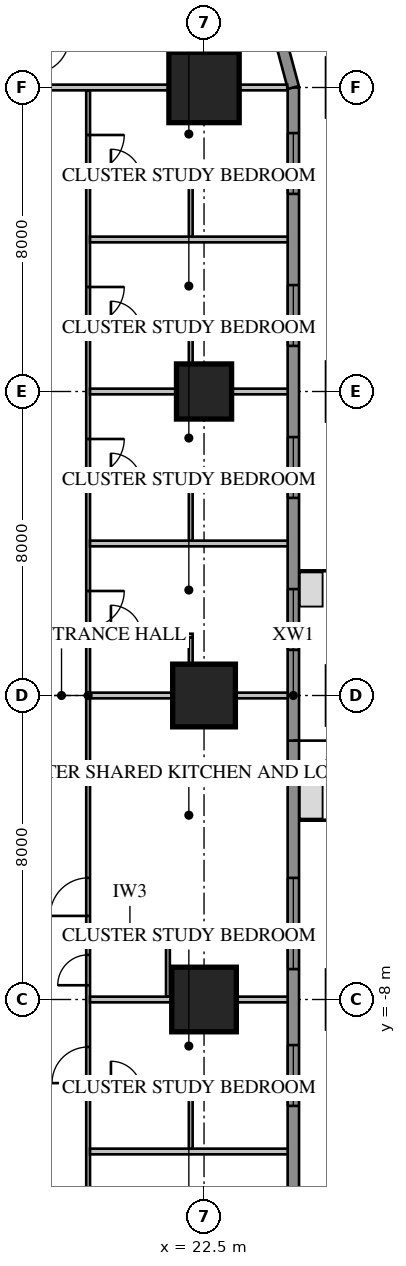
"""IFC4 building model, lengths in metres.
Left out: names, types, materials, properties, quantities, classifications, styles, units other than length and angle.
Written with IfcOpenShell. Run it as: python <this file> out.ifc"""

import sys

from ifc_helpers import new_model, si_unit, direction, frame, frame_2d, origin, origin_2d, place, context, subcontext, project, spatial, rectangle, extrude, element, fill, save


model = new_model("IFC4")
c1 = context("Model", 3, precision=1e-05, world=origin(), true_north=direction((0.0, 1.0)))
c2 = subcontext(c1, "Body", "Model", "MODEL_VIEW")
j1 = project(units=[si_unit("LENGTHUNIT", "METRE"), si_unit("PLANEANGLEUNIT", "RADIAN")], contexts=[c1])
p1 = place(None, origin())
s1 = spatial("IfcSite", under=j1, at=p1, CompositionType="ELEMENT")
p2 = place(p1, origin())
s2 = spatial("IfcBuilding", under=s1, at=p2, CompositionType="ELEMENT")
p3 = place(p2, frame((0.0, 0.0, 19.85)))
s3 = spatial("IfcBuildingStorey", under=s2, at=p3, CompositionType="ELEMENT", Elevation=19.85)
p4 = place(p3, frame((22.5, -8.0, 0.0), z_axis=(0.0, 0.0, 1.0), x_axis=(1.0, 0.0, 0.0)))
e1 = element("IfcColumn", 1, at=p4, inside=s3, PredefinedType="COLUMN", context=c2, shape_type="SweptSolid", body=[
    extrude(rectangle(XDim=1.7, YDim=1.7, at=origin_2d()), origin(), (0.0, 0.0, 1.0), 3.85),
])
p5 = place(p3, frame((22.5, 0.0, 0.0), z_axis=(0.0, 0.0, 1.0), x_axis=(1.0, 0.0, 0.0)))
e2 = element("IfcColumn", 2, at=p5, inside=s3, PredefinedType="COLUMN", context=c2, shape_type="SweptSolid", body=[
    extrude(rectangle(XDim=1.65, YDim=1.65, at=origin_2d()), origin(), (0.0, 0.0, 1.0), 3.85),
])
p6 = place(p3, frame((22.5, 8.0, 0.0), z_axis=(0.0, 0.0, 1.0), x_axis=(1.0, 0.0, 0.0)))
e3 = element("IfcColumn", 3, at=p6, inside=s3, PredefinedType="COLUMN", context=c2, shape_type="SweptSolid", body=[
    extrude(rectangle(XDim=1.45, YDim=1.45, at=origin_2d()), origin(), (0.0, 0.0, 1.0), 3.85),
])
p7 = place(p3, frame((22.5, 16.0, 0.0), z_axis=(0.0, 0.0, 1.0), x_axis=(1.0, 0.0, 0.0)))
e4 = element("IfcColumn", 4, at=p7, inside=s3, PredefinedType="COLUMN", context=c2, shape_type="SweptSolid", body=[
    extrude(rectangle(XDim=1.85, YDim=1.85, at=origin_2d()), origin(), (0.0, 0.0, 1.0), 3.85),
])
p8 = place(p3, frame((24.85, -16.0, 0.0), z_axis=(0.0, 0.0, 1.0), x_axis=(0.0, 1.0, 0.0)))
e5 = element("IfcWall", 5, at=p8, inside=s3, PredefinedType="SOLIDWALL", context=c2, shape_type="SweptSolid", body=[
    extrude(rectangle(XDim=32.0, YDim=0.3, at=frame_2d((16.0, 0.0))), origin(), (0.0, 0.0, 1.0), 3.65),
])
p9 = place(p8, frame((1.2, 0.0, 0.75)))
e6 = element("IfcOpeningElement", 6, at=p9, cuts=e5, PredefinedType="OPENING", context=c2, shape_type="SweptSolid", body=[
    extrude(rectangle(XDim=1.6, YDim=1.8, at=frame_2d((0.8, 0.9))), frame((0.0, 0.17, 0.0), z_axis=(0.0, -1.0, 0.0), x_axis=(1.0, 0.0, 0.0)), (0.0, 0.0, 1.0), 0.34),
])
p10 = place(p8, frame((5.2, 0.0, 0.75)))
e7 = element("IfcOpeningElement", 7, at=p10, cuts=e5, PredefinedType="OPENING", context=c2, shape_type="SweptSolid", body=[
    extrude(rectangle(XDim=1.6, YDim=1.8, at=frame_2d((0.8, 0.9))), frame((0.0, 0.17, 0.0), z_axis=(0.0, -1.0, 0.0), x_axis=(1.0, 0.0, 0.0)), (0.0, 0.0, 1.0), 0.34),
])
p11 = place(p8, frame((17.2, 0.0, 0.75)))
e8 = element("IfcOpeningElement", 8, at=p11, cuts=e5, PredefinedType="OPENING", context=c2, shape_type="SweptSolid", body=[
    extrude(rectangle(XDim=1.6, YDim=1.8, at=frame_2d((0.8, 0.9))), frame((0.0, 0.17, 0.0), z_axis=(0.0, -1.0, 0.0), x_axis=(1.0, 0.0, 0.0)), (0.0, 0.0, 1.0), 0.34),
])
p12 = place(p8, frame((21.2, 0.0, 0.75)))
e9 = element("IfcOpeningElement", 9, at=p12, cuts=e5, PredefinedType="OPENING", context=c2, shape_type="SweptSolid", body=[
    extrude(rectangle(XDim=1.6, YDim=1.8, at=frame_2d((0.8, 0.9))), frame((0.0, 0.17, 0.0), z_axis=(0.0, -1.0, 0.0), x_axis=(1.0, 0.0, 0.0)), (0.0, 0.0, 1.0), 0.34),
])
p13 = place(p8, frame((25.2, 0.0, 0.75)))
e10 = element("IfcOpeningElement", 10, at=p13, cuts=e5, PredefinedType="OPENING", context=c2, shape_type="SweptSolid", body=[
    extrude(rectangle(XDim=1.6, YDim=1.8, at=frame_2d((0.8, 0.9))), frame((0.0, 0.17, 0.0), z_axis=(0.0, -1.0, 0.0), x_axis=(1.0, 0.0, 0.0)), (0.0, 0.0, 1.0), 0.34),
])
p14 = place(p8, frame((29.2, 0.0, 0.75)))
e11 = element("IfcOpeningElement", 11, at=p14, cuts=e5, PredefinedType="OPENING", context=c2, shape_type="SweptSolid", body=[
    extrude(rectangle(XDim=1.6, YDim=1.8, at=frame_2d((0.8, 0.9))), frame((0.0, 0.17, 0.0), z_axis=(0.0, -1.0, 0.0), x_axis=(1.0, 0.0, 0.0)), (0.0, 0.0, 1.0), 0.34),
])
p15 = place(p8, frame((8.8, 0.0, 0.75)))
e12 = element("IfcOpeningElement", 12, at=p15, cuts=e5, PredefinedType="OPENING", context=c2, shape_type="SweptSolid", body=[
    extrude(rectangle(XDim=2.4, YDim=1.8, at=frame_2d((1.2, 0.9))), frame((0.0, 0.17, 0.0), z_axis=(0.0, -1.0, 0.0), x_axis=(1.0, 0.0, 0.0)), (0.0, 0.0, 1.0), 0.34),
])
p16 = place(p8, frame((13.812, 0.0, 0.0)))
e13 = element("IfcOpeningElement", 13, at=p16, cuts=e5, PredefinedType="OPENING", context=c2, shape_type="SweptSolid", body=[
    extrude(rectangle(XDim=1.0, YDim=2.4, at=frame_2d((0.5, 1.2))), frame((0.0, 0.17, 0.0), z_axis=(0.0, -1.0, 0.0), x_axis=(1.0, 0.0, 0.0)), (0.0, 0.0, 1.0), 0.34),
])
p17 = place(p3, frame((24.85, 16.0, 0.0), z_axis=(0.0, 0.0, 1.0), x_axis=(-0.258839972501, 0.965920218567, 0.0)))
e14 = element("IfcWall", 14, at=p17, inside=s3, PredefinedType="SOLIDWALL", context=c2, shape_type="SweptSolid", body=[
    extrude(rectangle(XDim=4.581, YDim=0.3, at=frame_2d((2.291, 0.0))), origin(), (0.0, 0.0, 1.0), 3.65),
])
p18 = place(p3, frame((19.45, -15.925, 0.0), z_axis=(0.0, 0.0, 1.0), x_axis=(0.0, 1.0, 0.0)))
e15 = element("IfcWall", 15, at=p18, inside=s3, PredefinedType="PARTITIONING", context=c2, shape_type="SweptSolid", body=[
    extrude(rectangle(XDim=31.85, YDim=0.1, at=frame_2d((15.925, 0.0))), origin(), (0.0, 0.0, 1.0), 3.65),
])
p19 = place(p18, frame((10.125, 0.0, 0.0)))
e16 = element("IfcOpeningElement", 16, at=p19, cuts=e15, PredefinedType="OPENING", context=c2, shape_type="SweptSolid", body=[
    extrude(rectangle(XDim=1.0, YDim=2.1, at=frame_2d((0.5, 1.05))), frame((0.0, 0.07, 0.0), z_axis=(0.0, -1.0, 0.0), x_axis=(1.0, 0.0, 0.0)), (0.0, 0.0, 1.0), 0.14),
])
p20 = place(p18, frame((8.3, 0.0, 0.0)))
e17 = element("IfcOpeningElement", 17, at=p20, cuts=e15, PredefinedType="OPENING", context=c2, shape_type="SweptSolid", body=[
    extrude(rectangle(XDim=0.8, YDim=2.1, at=frame_2d((0.4, 1.05))), frame((0.0, 0.07, 0.0), z_axis=(0.0, -1.0, 0.0), x_axis=(1.0, 0.0, 0.0)), (0.0, 0.0, 1.0), 0.14),
])
p21 = place(p18, frame((1.725, 0.0, 0.0)))
e18 = element("IfcOpeningElement", 18, at=p21, cuts=e15, PredefinedType="OPENING", context=c2, shape_type="SweptSolid", body=[
    extrude(rectangle(XDim=0.95, YDim=2.1, at=frame_2d((0.475, 1.05))), frame((0.0, 0.07, 0.0), z_axis=(0.0, -1.0, 0.0), x_axis=(1.0, 0.0, 0.0)), (0.0, 0.0, 1.0), 0.14),
])
p22 = place(p18, frame((5.725, 0.0, 0.0)))
e19 = element("IfcOpeningElement", 19, at=p22, cuts=e15, PredefinedType="OPENING", context=c2, shape_type="SweptSolid", body=[
    extrude(rectangle(XDim=0.95, YDim=2.1, at=frame_2d((0.475, 1.05))), frame((0.0, 0.07, 0.0), z_axis=(0.0, -1.0, 0.0), x_axis=(1.0, 0.0, 0.0)), (0.0, 0.0, 1.0), 0.14),
])
p23 = place(p18, frame((17.725, 0.0, 0.0)))
e20 = element("IfcOpeningElement", 20, at=p23, cuts=e15, PredefinedType="OPENING", context=c2, shape_type="SweptSolid", body=[
    extrude(rectangle(XDim=0.95, YDim=2.1, at=frame_2d((0.475, 1.05))), frame((0.0, 0.07, 0.0), z_axis=(0.0, -1.0, 0.0), x_axis=(1.0, 0.0, 0.0)), (0.0, 0.0, 1.0), 0.14),
])
p24 = place(p18, frame((21.725, 0.0, 0.0)))
e21 = element("IfcOpeningElement", 21, at=p24, cuts=e15, PredefinedType="OPENING", context=c2, shape_type="SweptSolid", body=[
    extrude(rectangle(XDim=0.95, YDim=2.1, at=frame_2d((0.475, 1.05))), frame((0.0, 0.07, 0.0), z_axis=(0.0, -1.0, 0.0), x_axis=(1.0, 0.0, 0.0)), (0.0, 0.0, 1.0), 0.14),
])
p25 = place(p18, frame((25.725, 0.0, 0.0)))
e22 = element("IfcOpeningElement", 22, at=p25, cuts=e15, PredefinedType="OPENING", context=c2, shape_type="SweptSolid", body=[
    extrude(rectangle(XDim=0.95, YDim=2.1, at=frame_2d((0.475, 1.05))), frame((0.0, 0.07, 0.0), z_axis=(0.0, -1.0, 0.0), x_axis=(1.0, 0.0, 0.0)), (0.0, 0.0, 1.0), 0.14),
])
p26 = place(p18, frame((29.725, 0.0, 0.0)))
e23 = element("IfcOpeningElement", 23, at=p26, cuts=e15, PredefinedType="OPENING", context=c2, shape_type="SweptSolid", body=[
    extrude(rectangle(XDim=0.95, YDim=2.1, at=frame_2d((0.475, 1.05))), frame((0.0, 0.07, 0.0), z_axis=(0.0, -1.0, 0.0), x_axis=(1.0, 0.0, 0.0)), (0.0, 0.0, 1.0), 0.14),
])
p27 = place(p3, frame((19.5, -6.275, 0.0), z_axis=(0.0, 0.0, 1.0), x_axis=(1.0, 0.0, 0.0)))
e24 = element("IfcWall", 24, at=p27, inside=s3, PredefinedType="PARTITIONING", context=c2, shape_type="SweptSolid", body=[
    extrude(rectangle(XDim=2.1, YDim=0.1, at=frame_2d((1.05, 0.0))), origin(), (0.0, 0.0, 1.0), 3.65),
])
p28 = place(p3, frame((21.55, -7.925, 0.0), z_axis=(0.0, 0.0, 1.0), x_axis=(0.0, 1.0, 0.0)))
e25 = element("IfcWall", 25, at=p28, inside=s3, PredefinedType="PARTITIONING", context=c2, shape_type="SweptSolid", body=[
    extrude(rectangle(XDim=1.7, YDim=0.1, at=frame_2d((0.85, 0.0))), origin(), (0.0, 0.0, 1.0), 3.65),
])
for number, where, z_axis, x_axis in (
    (26, (19.5, -12.0, 0.0), (0.0, 0.0, 1.0), (1.0, 0.0, 0.0)),
    (27, (19.5, -8.0, 0.0), (0.0, 0.0, 1.0), (1.0, 0.0, 0.0)),
):
    element("IfcWall", number, at=place(p3, frame(where, z_axis=z_axis, x_axis=x_axis)), inside=s3, PredefinedType="PARTITIONING", context=c2, shape_type="SweptSolid", body=[
        extrude(rectangle(XDim=5.2, YDim=0.15, at=frame_2d((2.6, 0.0))), origin(), (0.0, 0.0, 1.0), 3.65),
    ])
p29 = place(p3, frame((19.5, 0.0, 0.0), z_axis=(0.0, 0.0, 1.0), x_axis=(1.0, 0.0, 0.0)))
e28 = element("IfcWall", 28, at=p29, inside=s3, PredefinedType="PARTITIONING", context=c2, shape_type="SweptSolid", body=[
    extrude(rectangle(XDim=5.2, YDim=0.15, at=frame_2d((2.6, 0.0))), origin(), (0.0, 0.0, 1.0), 2.957),
])
for number, where, z_axis, x_axis in (
    (29, (19.5, 4.0, 0.0), (0.0, 0.0, 1.0), (1.0, 0.0, 0.0)),
    (30, (19.5, 8.0, 0.0), (0.0, 0.0, 1.0), (1.0, 0.0, 0.0)),
    (31, (19.5, 12.0, 0.0), (0.0, 0.0, 1.0), (1.0, 0.0, 0.0)),
):
    element("IfcWall", number, at=place(p3, frame(where, z_axis=z_axis, x_axis=x_axis)), inside=s3, PredefinedType="PARTITIONING", context=c2, shape_type="SweptSolid", body=[
        extrude(rectangle(XDim=5.2, YDim=0.15, at=frame_2d((2.6, 0.0))), origin(), (0.0, 0.0, 1.0), 3.65),
    ])
p30 = place(p3, frame((18.1, 16.0, 0.0), z_axis=(0.0, 0.0, 1.0), x_axis=(1.0, 0.0, 0.0)))
e32 = element("IfcWall", 32, at=p30, inside=s3, PredefinedType="PARTITIONING", context=c2, shape_type="SweptSolid", body=[
    extrude(rectangle(XDim=6.589, YDim=0.15, at=frame_2d((3.295, 0.0))), origin(), (0.0, 0.0, 1.0), 3.65),
])
p31 = place(p3, frame((19.5, -10.425, 0.0), z_axis=(0.0, 0.0, 1.0), x_axis=(1.0, 0.0, 0.0)))
e33 = element("IfcWall", 33, at=p31, inside=s3, PredefinedType="PARTITIONING", context=c2, shape_type="SweptSolid", body=[
    extrude(rectangle(XDim=2.7, YDim=0.1, at=frame_2d((1.35, 0.0))), origin(), (0.0, 0.0, 1.0), 3.65),
])
p32 = place(p31, frame((0.55, 0.0, 0.0)))
e34 = element("IfcOpeningElement", 34, at=p32, cuts=e33, PredefinedType="OPENING", context=c2, shape_type="SweptSolid", body=[
    extrude(rectangle(XDim=0.8, YDim=2.1, at=frame_2d((0.4, 1.05))), frame((0.0, 0.07, 0.0), z_axis=(0.0, -1.0, 0.0), x_axis=(1.0, 0.0, 0.0)), (0.0, 0.0, 1.0), 0.14),
])
p33 = place(p3, frame((22.15, -11.925, 0.0), z_axis=(0.0, 0.0, 1.0), x_axis=(0.0, 1.0, 0.0)))
e35 = element("IfcWall", 35, at=p33, inside=s3, PredefinedType="PARTITIONING", context=c2, shape_type="SweptSolid", body=[
    extrude(rectangle(XDim=1.45, YDim=0.1, at=frame_2d((0.725, 0.0))), origin(), (0.0, 0.0, 1.0), 3.65),
])
p34 = place(p3, frame((19.5, 1.575, 0.0), z_axis=(0.0, 0.0, 1.0), x_axis=(1.0, 0.0, 0.0)))
e36 = element("IfcWall", 36, at=p34, inside=s3, PredefinedType="PARTITIONING", context=c2, shape_type="SweptSolid", body=[
    extrude(rectangle(XDim=2.7, YDim=0.1, at=frame_2d((1.35, 0.0))), origin(), (0.0, 0.0, 1.0), 3.65),
])
p35 = place(p34, frame((0.55, 0.0, 0.0)))
e37 = element("IfcOpeningElement", 37, at=p35, cuts=e36, PredefinedType="OPENING", context=c2, shape_type="SweptSolid", body=[
    extrude(rectangle(XDim=0.8, YDim=2.1, at=frame_2d((0.4, 1.05))), frame((0.0, 0.07, 0.0), z_axis=(0.0, -1.0, 0.0), x_axis=(1.0, 0.0, 0.0)), (0.0, 0.0, 1.0), 0.14),
])
p36 = place(p3, frame((22.15, 0.075, 0.0), z_axis=(0.0, 0.0, 1.0), x_axis=(0.0, 1.0, 0.0)))
e38 = element("IfcWall", 38, at=p36, inside=s3, PredefinedType="PARTITIONING", context=c2, shape_type="SweptSolid", body=[
    extrude(rectangle(XDim=1.45, YDim=0.1, at=frame_2d((0.725, 0.0))), origin(), (0.0, 0.0, 1.0), 3.65),
])
p37 = place(p3, frame((19.5, 5.575, 0.0), z_axis=(0.0, 0.0, 1.0), x_axis=(1.0, 0.0, 0.0)))
e39 = element("IfcWall", 39, at=p37, inside=s3, PredefinedType="PARTITIONING", context=c2, shape_type="SweptSolid", body=[
    extrude(rectangle(XDim=2.7, YDim=0.1, at=frame_2d((1.35, 0.0))), origin(), (0.0, 0.0, 1.0), 3.65),
])
p38 = place(p37, frame((0.55, 0.0, 0.0)))
e40 = element("IfcOpeningElement", 40, at=p38, cuts=e39, PredefinedType="OPENING", context=c2, shape_type="SweptSolid", body=[
    extrude(rectangle(XDim=0.8, YDim=2.1, at=frame_2d((0.4, 1.05))), frame((0.0, 0.07, 0.0), z_axis=(0.0, -1.0, 0.0), x_axis=(1.0, 0.0, 0.0)), (0.0, 0.0, 1.0), 0.14),
])
p39 = place(p3, frame((22.15, 4.075, 0.0), z_axis=(0.0, 0.0, 1.0), x_axis=(0.0, 1.0, 0.0)))
e41 = element("IfcWall", 41, at=p39, inside=s3, PredefinedType="PARTITIONING", context=c2, shape_type="SweptSolid", body=[
    extrude(rectangle(XDim=1.45, YDim=0.1, at=frame_2d((0.725, 0.0))), origin(), (0.0, 0.0, 1.0), 3.65),
])
p40 = place(p3, frame((19.5, 9.575, 0.0), z_axis=(0.0, 0.0, 1.0), x_axis=(1.0, 0.0, 0.0)))
e42 = element("IfcWall", 42, at=p40, inside=s3, PredefinedType="PARTITIONING", context=c2, shape_type="SweptSolid", body=[
    extrude(rectangle(XDim=2.7, YDim=0.1, at=frame_2d((1.35, 0.0))), origin(), (0.0, 0.0, 1.0), 3.65),
])
p41 = place(p40, frame((0.55, 0.0, 0.0)))
e43 = element("IfcOpeningElement", 43, at=p41, cuts=e42, PredefinedType="OPENING", context=c2, shape_type="SweptSolid", body=[
    extrude(rectangle(XDim=0.8, YDim=2.1, at=frame_2d((0.4, 1.05))), frame((0.0, 0.07, 0.0), z_axis=(0.0, -1.0, 0.0), x_axis=(1.0, 0.0, 0.0)), (0.0, 0.0, 1.0), 0.14),
])
p42 = place(p3, frame((22.15, 8.075, 0.0), z_axis=(0.0, 0.0, 1.0), x_axis=(0.0, 1.0, 0.0)))
e44 = element("IfcWall", 44, at=p42, inside=s3, PredefinedType="PARTITIONING", context=c2, shape_type="SweptSolid", body=[
    extrude(rectangle(XDim=1.45, YDim=0.1, at=frame_2d((0.725, 0.0))), origin(), (0.0, 0.0, 1.0), 3.65),
])
p43 = place(p3, frame((19.5, 13.575, 0.0), z_axis=(0.0, 0.0, 1.0), x_axis=(1.0, 0.0, 0.0)))
e45 = element("IfcWall", 45, at=p43, inside=s3, PredefinedType="PARTITIONING", context=c2, shape_type="SweptSolid", body=[
    extrude(rectangle(XDim=2.7, YDim=0.1, at=frame_2d((1.35, 0.0))), origin(), (0.0, 0.0, 1.0), 3.65),
])
p44 = place(p43, frame((0.55, 0.0, 0.0)))
e46 = element("IfcOpeningElement", 46, at=p44, cuts=e45, PredefinedType="OPENING", context=c2, shape_type="SweptSolid", body=[
    extrude(rectangle(XDim=0.8, YDim=2.1, at=frame_2d((0.4, 1.05))), frame((0.0, 0.07, 0.0), z_axis=(0.0, -1.0, 0.0), x_axis=(1.0, 0.0, 0.0)), (0.0, 0.0, 1.0), 0.14),
])
p45 = place(p3, frame((22.15, 12.075, 0.0), z_axis=(0.0, 0.0, 1.0), x_axis=(0.0, 1.0, 0.0)))
e47 = element("IfcWall", 47, at=p45, inside=s3, PredefinedType="PARTITIONING", context=c2, shape_type="SweptSolid", body=[
    extrude(rectangle(XDim=1.45, YDim=0.1, at=frame_2d((0.725, 0.0))), origin(), (0.0, 0.0, 1.0), 3.65),
])
p46 = place(p10, origin())
e48 = element("IfcWindow", 48, at=p46, inside=s3, PartitioningType="SINGLE_PANEL", PredefinedType="WINDOW", context=c2, shape_type="SweptSolid", body=[
    extrude(rectangle(XDim=1.6, YDim=1.8, at=frame_2d((0.8, 0.9))), frame((0.0, 0.03, 0.0), z_axis=(0.0, -1.0, 0.0), x_axis=(1.0, 0.0, 0.0)), (0.0, 0.0, 1.0), 0.06),
])
fill(e7, e48)
p47 = place(p11, origin())
e49 = element("IfcWindow", 49, at=p47, inside=s3, PartitioningType="SINGLE_PANEL", PredefinedType="WINDOW", context=c2, shape_type="SweptSolid", body=[
    extrude(rectangle(XDim=1.6, YDim=1.8, at=frame_2d((0.8, 0.9))), frame((0.0, 0.03, 0.0), z_axis=(0.0, -1.0, 0.0), x_axis=(1.0, 0.0, 0.0)), (0.0, 0.0, 1.0), 0.06),
])
fill(e8, e49)
p48 = place(p12, origin())
e50 = element("IfcWindow", 50, at=p48, inside=s3, PartitioningType="SINGLE_PANEL", PredefinedType="WINDOW", context=c2, shape_type="SweptSolid", body=[
    extrude(rectangle(XDim=1.6, YDim=1.8, at=frame_2d((0.8, 0.9))), frame((0.0, 0.03, 0.0), z_axis=(0.0, -1.0, 0.0), x_axis=(1.0, 0.0, 0.0)), (0.0, 0.0, 1.0), 0.06),
])
fill(e9, e50)
p49 = place(p13, origin())
e51 = element("IfcWindow", 51, at=p49, inside=s3, PartitioningType="SINGLE_PANEL", PredefinedType="WINDOW", context=c2, shape_type="SweptSolid", body=[
    extrude(rectangle(XDim=1.6, YDim=1.8, at=frame_2d((0.8, 0.9))), frame((0.0, 0.03, 0.0), z_axis=(0.0, -1.0, 0.0), x_axis=(1.0, 0.0, 0.0)), (0.0, 0.0, 1.0), 0.06),
])
fill(e10, e51)
p50 = place(p14, origin())
e52 = element("IfcWindow", 52, at=p50, inside=s3, PartitioningType="SINGLE_PANEL", PredefinedType="WINDOW", context=c2, shape_type="SweptSolid", body=[
    extrude(rectangle(XDim=1.6, YDim=1.8, at=frame_2d((0.8, 0.9))), frame((0.0, 0.03, 0.0), z_axis=(0.0, -1.0, 0.0), x_axis=(1.0, 0.0, 0.0)), (0.0, 0.0, 1.0), 0.06),
])
fill(e11, e52)
p51 = place(p15, origin())
e53 = element("IfcWindow", 53, at=p51, inside=s3, PartitioningType="SINGLE_PANEL", PredefinedType="WINDOW", context=c2, shape_type="SweptSolid", body=[
    extrude(rectangle(XDim=2.4, YDim=1.8, at=frame_2d((1.2, 0.9))), frame((0.0, 0.03, 0.0), z_axis=(0.0, -1.0, 0.0), x_axis=(1.0, 0.0, 0.0)), (0.0, 0.0, 1.0), 0.06),
])
fill(e12, e53)
p52 = place(p16, origin())
e54 = element("IfcDoor", 54, at=p52, inside=s3, OperationType="SINGLE_SWING_RIGHT", PredefinedType="DOOR", context=c2, shape_type="SweptSolid", body=[
    extrude(rectangle(XDim=1.0, YDim=2.4, at=frame_2d((0.5, 1.2))), frame((0.0, 0.025, 0.0), z_axis=(0.0, -1.0, 0.0), x_axis=(1.0, 0.0, 0.0)), (0.0, 0.0, 1.0), 0.05),
])
fill(e13, e54)
p53 = place(p19, origin())
e55 = element("IfcDoor", 55, at=p53, inside=s3, OperationType="SINGLE_SWING_LEFT", PredefinedType="DOOR", context=c2, shape_type="SweptSolid", body=[
    extrude(rectangle(XDim=1.0, YDim=2.1, at=frame_2d((0.5, 1.05))), frame((0.0, 0.025, 0.0), z_axis=(0.0, -1.0, 0.0), x_axis=(1.0, 0.0, 0.0)), (0.0, 0.0, 1.0), 0.05),
])
fill(e16, e55)
p54 = place(p20, origin())
e56 = element("IfcDoor", 56, at=p54, inside=s3, OperationType="SINGLE_SWING_LEFT", PredefinedType="DOOR", context=c2, shape_type="SweptSolid", body=[
    extrude(rectangle(XDim=0.8, YDim=2.1, at=frame_2d((0.4, 1.05))), frame((0.0, 0.025, 0.0), z_axis=(0.0, -1.0, 0.0), x_axis=(1.0, 0.0, 0.0)), (0.0, 0.0, 1.0), 0.05),
])
fill(e17, e56)
p55 = place(p22, origin())
e57 = element("IfcDoor", 57, at=p55, inside=s3, OperationType="SINGLE_SWING_LEFT", PredefinedType="DOOR", context=c2, shape_type="SweptSolid", body=[
    extrude(rectangle(XDim=0.95, YDim=2.1, at=frame_2d((0.475, 1.05))), frame((0.0, 0.025, 0.0), z_axis=(0.0, -1.0, 0.0), x_axis=(1.0, 0.0, 0.0)), (0.0, 0.0, 1.0), 0.05),
])
fill(e19, e57)
p56 = place(p32, origin())
e58 = element("IfcDoor", 58, at=p56, inside=s3, OperationType="SINGLE_SWING_LEFT", PredefinedType="DOOR", context=c2, shape_type="SweptSolid", body=[
    extrude(rectangle(XDim=0.8, YDim=2.1, at=frame_2d((0.4, 1.05))), frame((0.0, 0.025, 0.0), z_axis=(0.0, -1.0, 0.0), x_axis=(1.0, 0.0, 0.0)), (0.0, 0.0, 1.0), 0.05),
])
fill(e34, e58)
p57 = place(p23, origin())
e59 = element("IfcDoor", 59, at=p57, inside=s3, OperationType="SINGLE_SWING_RIGHT", PredefinedType="DOOR", context=c2, shape_type="SweptSolid", body=[
    extrude(rectangle(XDim=0.95, YDim=2.1, at=frame_2d((0.475, 1.05))), frame((0.0, 0.025, 0.0), z_axis=(0.0, -1.0, 0.0), x_axis=(1.0, 0.0, 0.0)), (0.0, 0.0, 1.0), 0.05),
])
fill(e20, e59)
p58 = place(p35, origin())
e60 = element("IfcDoor", 60, at=p58, inside=s3, OperationType="SINGLE_SWING_LEFT", PredefinedType="DOOR", context=c2, shape_type="SweptSolid", body=[
    extrude(rectangle(XDim=0.8, YDim=2.1, at=frame_2d((0.4, 1.05))), frame((0.0, 0.025, 0.0), z_axis=(0.0, -1.0, 0.0), x_axis=(1.0, 0.0, 0.0)), (0.0, 0.0, 1.0), 0.05),
])
fill(e37, e60)
p59 = place(p24, origin())
e61 = element("IfcDoor", 61, at=p59, inside=s3, OperationType="SINGLE_SWING_RIGHT", PredefinedType="DOOR", context=c2, shape_type="SweptSolid", body=[
    extrude(rectangle(XDim=0.95, YDim=2.1, at=frame_2d((0.475, 1.05))), frame((0.0, 0.025, 0.0), z_axis=(0.0, -1.0, 0.0), x_axis=(1.0, 0.0, 0.0)), (0.0, 0.0, 1.0), 0.05),
])
fill(e21, e61)
p60 = place(p38, origin())
e62 = element("IfcDoor", 62, at=p60, inside=s3, OperationType="SINGLE_SWING_LEFT", PredefinedType="DOOR", context=c2, shape_type="SweptSolid", body=[
    extrude(rectangle(XDim=0.8, YDim=2.1, at=frame_2d((0.4, 1.05))), frame((0.0, 0.025, 0.0), z_axis=(0.0, -1.0, 0.0), x_axis=(1.0, 0.0, 0.0)), (0.0, 0.0, 1.0), 0.05),
])
fill(e40, e62)
p61 = place(p25, origin())
e63 = element("IfcDoor", 63, at=p61, inside=s3, OperationType="SINGLE_SWING_RIGHT", PredefinedType="DOOR", context=c2, shape_type="SweptSolid", body=[
    extrude(rectangle(XDim=0.95, YDim=2.1, at=frame_2d((0.475, 1.05))), frame((0.0, 0.025, 0.0), z_axis=(0.0, -1.0, 0.0), x_axis=(1.0, 0.0, 0.0)), (0.0, 0.0, 1.0), 0.05),
])
fill(e22, e63)
p62 = place(p41, origin())
e64 = element("IfcDoor", 64, at=p62, inside=s3, OperationType="SINGLE_SWING_LEFT", PredefinedType="DOOR", context=c2, shape_type="SweptSolid", body=[
    extrude(rectangle(XDim=0.8, YDim=2.1, at=frame_2d((0.4, 1.05))), frame((0.0, 0.025, 0.0), z_axis=(0.0, -1.0, 0.0), x_axis=(1.0, 0.0, 0.0)), (0.0, 0.0, 1.0), 0.05),
])
fill(e43, e64)
p63 = place(p26, origin())
e65 = element("IfcDoor", 65, at=p63, inside=s3, OperationType="SINGLE_SWING_RIGHT", PredefinedType="DOOR", context=c2, shape_type="SweptSolid", body=[
    extrude(rectangle(XDim=0.95, YDim=2.1, at=frame_2d((0.475, 1.05))), frame((0.0, 0.025, 0.0), z_axis=(0.0, -1.0, 0.0), x_axis=(1.0, 0.0, 0.0)), (0.0, 0.0, 1.0), 0.05),
])
fill(e23, e65)
p64 = place(p44, origin())
e66 = element("IfcDoor", 66, at=p64, inside=s3, OperationType="SINGLE_SWING_LEFT", PredefinedType="DOOR", context=c2, shape_type="SweptSolid", body=[
    extrude(rectangle(XDim=0.8, YDim=2.1, at=frame_2d((0.4, 1.05))), frame((0.0, 0.025, 0.0), z_axis=(0.0, -1.0, 0.0), x_axis=(1.0, 0.0, 0.0)), (0.0, 0.0, 1.0), 0.05),
])
fill(e46, e66)
save(model, sys.argv[1])
